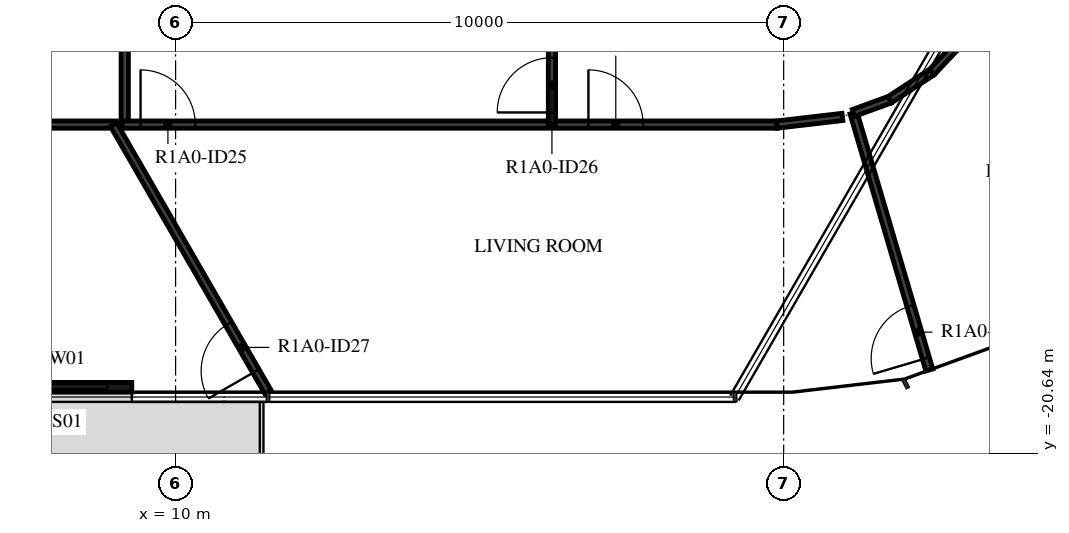
"""IFC4 building model, lengths in metres.
Left out: names, types, materials, properties, quantities, classifications, styles, units other than length and angle.
Written with IfcOpenShell. Run it as: python <this file> out.ifc"""

import sys

from ifc_helpers import new_model, si_unit, direction, frame, frame_2d, origin, place, context, subcontext, project, spatial, rectangle, extrude, element, fill, save


model = new_model("IFC4")
c1 = context("Model", 3, precision=1e-05, world=origin(), true_north=direction((0.0, 1.0)))
c2 = subcontext(c1, "Body", "Model", "MODEL_VIEW")
j1 = project(units=[si_unit("LENGTHUNIT", "METRE"), si_unit("PLANEANGLEUNIT", "RADIAN")], contexts=[c1])
p1 = place(None, origin())
s1 = spatial("IfcSite", under=j1, at=p1, CompositionType="ELEMENT")
p2 = place(p1, origin())
s2 = spatial("IfcBuilding", under=s1, at=p2, CompositionType="ELEMENT")
p3 = place(p2, frame((0.0, 0.0, 45.4)))
s3 = spatial("IfcBuildingStorey", under=s2, at=p3, CompositionType="ELEMENT", Elevation=45.4)
p4 = place(p3, frame((6.08, -19.55, 0.0), z_axis=(0.0, 0.0, 1.0), x_axis=(1.0, 0.0, 0.0)))
e1 = element("IfcWall", 1, at=p4, inside=s3, PredefinedType="STANDARD", context=c2, shape_type="SweptSolid", body=[
    extrude(rectangle(XDim=3.2, YDim=0.16, at=frame_2d((1.6, 0.0))), origin(), (0.0, 0.0, 1.0), 3.12),
])
p5 = place(p4, frame((0.4, 0.0, 0.0)))
e2 = element("IfcOpeningElement", 2, at=p5, cuts=e1, PredefinedType="OPENING", context=c2, shape_type="SweptSolid", body=[
    extrude(rectangle(XDim=2.4, YDim=2.4, at=frame_2d((1.2, 1.2))), frame((0.0, 0.09, 0.0), z_axis=(0.0, -1.0, 0.0), x_axis=(1.0, 0.0, 0.0)), (0.0, 0.0, 1.0), 0.18),
])
p6 = place(p3, frame((27.025, -15.603, 0.0), z_axis=(0.0, 0.0, 1.0), x_axis=(-0.866030653443, 0.499990907215, 0.0)))
e3 = element("IfcWall", 3, at=p6, inside=s3, PredefinedType="STANDARD", context=c2, shape_type="SweptSolid", body=[
    extrude(rectangle(XDim=6.271, YDim=0.2, at=frame_2d((3.136, 0.0))), origin(), (0.0, 0.0, 1.0), 3.12),
])
p7 = place(p3, frame((2.139, -15.23, 0.0), z_axis=(0.0, 0.0, 1.0), x_axis=(1.0, 0.0, 0.0)))
e4 = element("IfcWall", 4, at=p7, inside=s3, PredefinedType="PARTITIONING", context=c2, shape_type="SweptSolid", body=[
    extrude(rectangle(XDim=6.887, YDim=0.12, at=frame_2d((3.444, 0.0))), origin(), (0.0, 0.0, 1.0), 3.12),
])
p8 = place(p3, frame((4.073, -15.2, 0.0), z_axis=(0.0, 0.0, 1.0), x_axis=(0.866034128446, 0.499984888139, 0.0)))
e5 = element("IfcWall", 5, at=p8, inside=s3, PredefinedType="PARTITIONING", context=c2, shape_type="SweptSolid", body=[
    extrude(rectangle(XDim=5.879, YDim=0.12, at=frame_2d((2.939, 0.0))), origin(), (0.0, 0.0, 1.0), 3.12),
])
p9 = place(p8, frame((1.4, 0.0, 0.0)))
e6 = element("IfcOpeningElement", 6, at=p9, cuts=e5, PredefinedType="OPENING", context=c2, shape_type="SweptSolid", body=[
    extrude(rectangle(XDim=0.8, YDim=2.1, at=frame_2d((0.4, 1.05))), frame((0.0, 0.07, 0.0), z_axis=(0.0, -1.0, 0.0), x_axis=(1.0, 0.0, 0.0)), (0.0, 0.0, 1.0), 0.14),
])
p10 = place(p3, frame((9.164, -12.261, 0.0), z_axis=(0.0, 0.0, 1.0), x_axis=(0.0, -1.0, 0.0)))
e7 = element("IfcWall", 7, at=p10, inside=s3, PredefinedType="PARTITIONING", context=c2, shape_type="SweptSolid", body=[
    extrude(rectangle(XDim=2.969, YDim=0.12, at=frame_2d((1.485, 0.0))), origin(), (0.0, 0.0, 1.0), 3.12),
])
p11 = place(p3, frame((9.124, -15.23, 0.0), z_axis=(0.0, 0.0, 1.0), x_axis=(1.0, 0.0, 0.0)))
e8 = element("IfcWall", 8, at=p11, inside=s3, PredefinedType="PARTITIONING", context=c2, shape_type="SweptSolid", body=[
    extrude(rectangle(XDim=10.764, YDim=0.12, at=frame_2d((5.382, 0.0))), origin(), (0.0, 0.0, 1.0), 3.12),
])
p12 = place(p11, frame((0.3, 0.0, 0.0)))
e9 = element("IfcOpeningElement", 9, at=p12, cuts=e8, PredefinedType="OPENING", context=c2, shape_type="SweptSolid", body=[
    extrude(rectangle(XDim=0.9, YDim=2.1, at=frame_2d((0.45, 1.05))), frame((0.0, 0.07, 0.0), z_axis=(0.0, -1.0, 0.0), x_axis=(1.0, 0.0, 0.0)), (0.0, 0.0, 1.0), 0.14),
])
p13 = place(p11, frame((7.665, 0.0, 0.0)))
e10 = element("IfcOpeningElement", 10, at=p13, cuts=e8, PredefinedType="OPENING", context=c2, shape_type="SweptSolid", body=[
    extrude(rectangle(XDim=0.9, YDim=2.1, at=frame_2d((0.45, 1.05))), frame((0.0, 0.07, 0.0), z_axis=(0.0, -1.0, 0.0), x_axis=(1.0, 0.0, 0.0)), (0.0, 0.0, 1.0), 0.14),
])
p14 = place(p3, frame((16.189, -15.23, 0.0), z_axis=(0.0, 0.0, 1.0), x_axis=(0.0, 1.0, 0.0)))
e11 = element("IfcWall", 11, at=p14, inside=s3, PredefinedType="PARTITIONING", context=c2, shape_type="SweptSolid", body=[
    extrude(rectangle(XDim=5.883, YDim=0.12, at=frame_2d((2.942, 0.0))), origin(), (0.0, 0.0, 1.0), 3.12),
])
p15 = place(p14, frame((0.2, 0.0, 0.0)))
e12 = element("IfcOpeningElement", 12, at=p15, cuts=e11, PredefinedType="OPENING", context=c2, shape_type="SweptSolid", body=[
    extrude(rectangle(XDim=0.9, YDim=2.1, at=frame_2d((0.45, 1.05))), frame((0.0, 0.07, 0.0), z_axis=(0.0, -1.0, 0.0), x_axis=(1.0, 0.0, 0.0)), (0.0, 0.0, 1.0), 0.14),
])
p16 = place(p3, frame((11.52, -19.63, 0.0), z_axis=(0.0, 0.0, 1.0), x_axis=(-0.499999763888, 0.866025540104, 0.0)))
e13 = element("IfcWall", 13, at=p16, inside=s3, PredefinedType="PARTITIONING", context=c2, shape_type="SweptSolid", body=[
    extrude(rectangle(XDim=5.081, YDim=0.12, at=frame_2d((2.54, 0.0))), origin(), (0.0, 0.0, 1.0), 3.12),
])
p17 = place(p16, frame((0.4, 0.0, 0.0)))
e14 = element("IfcOpeningElement", 14, at=p17, cuts=e13, PredefinedType="OPENING", context=c2, shape_type="SweptSolid", body=[
    extrude(rectangle(XDim=0.9, YDim=2.1, at=frame_2d((0.45, 1.05))), frame((0.0, 0.07, 0.0), z_axis=(0.0, -1.0, 0.0), x_axis=(1.0, 0.0, 0.0)), (0.0, 0.0, 1.0), 0.14),
])
p18 = place(p3, frame((20.967, -15.104, 0.0), z_axis=(0.0, 0.0, 1.0), x_axis=(-0.993231641151, -0.116150363826, 0.0)))
e15 = element("IfcWall", 15, at=p18, inside=s3, PredefinedType="PARTITIONING", context=c2, shape_type="SweptSolid", body=[
    extrude(rectangle(XDim=1.087, YDim=0.12, at=frame_2d((0.543, 0.0))), origin(), (0.0, 0.0, 1.0), 3.12),
])
p19 = place(p3, frame((22.396, -19.266, 0.0), z_axis=(0.0, 0.0, 1.0), x_axis=(-0.282873823334, 0.959157130022, 0.0)))
e16 = element("IfcWall", 16, at=p19, inside=s3, PredefinedType="PARTITIONING", context=c2, shape_type="SweptSolid", body=[
    extrude(rectangle(XDim=4.409, YDim=0.12, at=frame_2d((2.204, 0.0))), origin(), (0.0, 0.0, 1.0), 3.12),
])
p20 = place(p19, frame((0.2, 0.0, 0.0)))
e17 = element("IfcOpeningElement", 17, at=p20, cuts=e16, PredefinedType="OPENING", context=c2, shape_type="SweptSolid", body=[
    extrude(rectangle(XDim=0.9, YDim=2.1, at=frame_2d((0.45, 1.05))), frame((0.0, 0.07, 0.0), z_axis=(0.0, -1.0, 0.0), x_axis=(1.0, 0.0, 0.0)), (0.0, 0.0, 1.0), 0.14),
])
p21 = place(p3, frame((21.149, -15.038, 0.0), z_axis=(0.0, 0.0, 1.0), x_axis=(0.939726102094, 0.341928140173, 0.0)))
e18 = element("IfcWall", 18, at=p21, inside=s3, PredefinedType="PARTITIONING", context=c2, shape_type="SweptSolid", body=[
    extrude(rectangle(XDim=0.635, YDim=0.12, at=frame_2d((0.318, 0.0))), origin(), (0.0, 0.0, 1.0), 3.12),
])
p22 = place(p3, frame((21.746, -14.82, 0.0), z_axis=(0.0, 0.0, 1.0), x_axis=(0.835477570013, 0.549524549046, 0.0)))
e19 = element("IfcWall", 19, at=p22, inside=s3, PredefinedType="PARTITIONING", context=c2, shape_type="SweptSolid", body=[
    extrude(rectangle(XDim=0.829, YDim=0.12, at=frame_2d((0.415, 0.0))), origin(), (0.0, 0.0, 1.0), 3.12),
])
p23 = place(p3, frame((22.438, -14.365, 0.0), z_axis=(0.0, 0.0, 1.0), x_axis=(0.686182189596, 0.727429723535, 0.0)))
e20 = element("IfcWall", 20, at=p23, inside=s3, PredefinedType="PARTITIONING", context=c2, shape_type="SweptSolid", body=[
    extrude(rectangle(XDim=0.829, YDim=0.12, at=frame_2d((0.414, 0.0))), origin(), (0.0, 0.0, 1.0), 3.12),
])
p24 = place(p5, origin())
e21 = element("IfcDoor", 21, at=p24, inside=s3, OperationType="DOUBLE_DOOR_SLIDING", PredefinedType="DOOR", context=c2, shape_type="SweptSolid", body=[
    extrude(rectangle(XDim=2.4, YDim=2.4, at=frame_2d((1.2, 1.2))), frame((0.0, 0.025, 0.0), z_axis=(0.0, -1.0, 0.0), x_axis=(1.0, 0.0, 0.0)), (0.0, 0.0, 1.0), 0.05),
])
fill(e2, e21)
p25 = place(p12, origin())
e22 = element("IfcDoor", 22, at=p25, inside=s3, OperationType="SINGLE_SWING_RIGHT", PredefinedType="DOOR", context=c2, shape_type="SweptSolid", body=[
    extrude(rectangle(XDim=0.9, YDim=2.1, at=frame_2d((0.45, 1.05))), frame((0.0, 0.025, 0.0), z_axis=(0.0, -1.0, 0.0), x_axis=(1.0, 0.0, 0.0)), (0.0, 0.0, 1.0), 0.05),
])
fill(e9, e22)
p26 = place(p15, origin())
e23 = element("IfcDoor", 23, at=p26, inside=s3, OperationType="SINGLE_SWING_RIGHT", PredefinedType="DOOR", context=c2, shape_type="SweptSolid", body=[
    extrude(rectangle(XDim=0.9, YDim=2.1, at=frame_2d((0.45, 1.05))), frame((0.0, 0.025, 0.0), z_axis=(0.0, -1.0, 0.0), x_axis=(1.0, 0.0, 0.0)), (0.0, 0.0, 1.0), 0.05),
])
fill(e12, e23)
p27 = place(p17, origin())
e24 = element("IfcDoor", 24, at=p27, inside=s3, OperationType="SINGLE_SWING_LEFT", PredefinedType="DOOR", context=c2, shape_type="SweptSolid", body=[
    extrude(rectangle(XDim=0.9, YDim=2.1, at=frame_2d((0.45, 1.05))), frame((0.0, 0.025, 0.0), z_axis=(0.0, -1.0, 0.0), x_axis=(1.0, 0.0, 0.0)), (0.0, 0.0, 1.0), 0.05),
])
fill(e14, e24)
p28 = place(p20, origin())
e25 = element("IfcDoor", 25, at=p28, inside=s3, OperationType="SINGLE_SWING_RIGHT", PredefinedType="DOOR", context=c2, shape_type="SweptSolid", body=[
    extrude(rectangle(XDim=0.9, YDim=2.1, at=frame_2d((0.45, 1.05))), frame((0.0, 0.025, 0.0), z_axis=(0.0, -1.0, 0.0), x_axis=(1.0, 0.0, 0.0)), (0.0, 0.0, 1.0), 0.05),
])
fill(e17, e25)
p29 = place(p13, origin())
e26 = element("IfcDoor", 26, at=p29, inside=s3, OperationType="SINGLE_SWING_LEFT", PredefinedType="DOOR", context=c2, shape_type="SweptSolid", body=[
    extrude(rectangle(XDim=0.9, YDim=2.1, at=frame_2d((0.45, 1.05))), frame((0.0, 0.025, 0.0), z_axis=(0.0, -1.0, 0.0), x_axis=(1.0, 0.0, 0.0)), (0.0, 0.0, 1.0), 0.05),
])
fill(e10, e26)
save(model, sys.argv[1])
